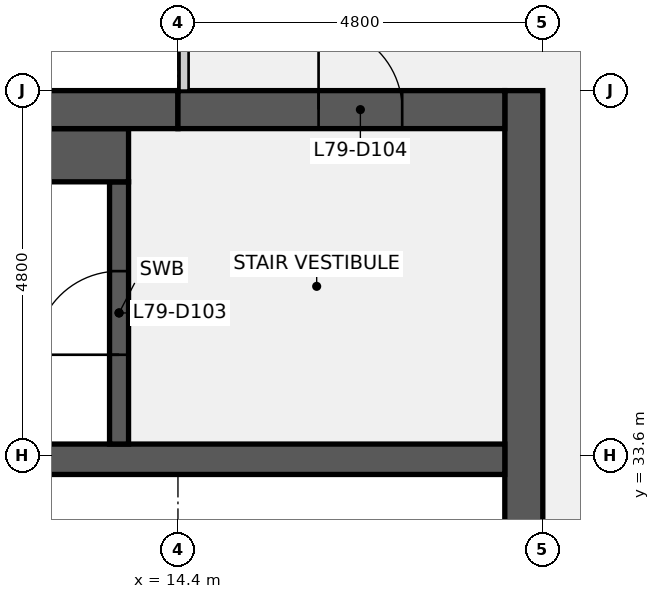
"""IFC4 building model, lengths in metres.
Left out: names, types, materials, properties, quantities, classifications, styles, units other than length and angle.
Written with IfcOpenShell. Run it as: python <this file> out.ifc"""

import sys

from ifc_helpers import new_model, si_unit, direction, frame, frame_2d, origin, place, context, subcontext, project, spatial, rectangle, extrude, element, fill, save


model = new_model("IFC4")
c1 = context("Model", 3, precision=1e-05, world=origin(), true_north=direction((0.0, 1.0)))
c2 = subcontext(c1, "Body", "Model", "MODEL_VIEW")
j1 = project(units=[si_unit("LENGTHUNIT", "METRE"), si_unit("PLANEANGLEUNIT", "RADIAN")], contexts=[c1])
p1 = place(None, origin())
s1 = spatial("IfcSite", under=j1, at=p1, CompositionType="ELEMENT")
p2 = place(p1, origin())
s2 = spatial("IfcBuilding", under=s1, at=p2, CompositionType="ELEMENT")
p3 = place(p2, frame((0.0, 0.0, 354.3)))
s3 = spatial("IfcBuildingStorey", under=s2, at=p3, CompositionType="ELEMENT", Elevation=354.3)
p4 = place(p3, frame((18.95, 38.4, 0.0), z_axis=(0.0, 0.0, 1.0), x_axis=(0.0, -1.0, 0.0)))
e1 = element("IfcWall", 1, at=p4, inside=s3, PredefinedType="SHEAR", context=c2, shape_type="SweptSolid", body=[
    extrude(rectangle(XDim=28.8, YDim=0.5, at=frame_2d((14.4, 0.0))), origin(), (0.0, 0.0, 1.0), 3.75),
])
p5 = place(p4, frame((18.3, 0.0, 0.0)))
e2 = element("IfcOpeningElement", 2, at=p5, cuts=e1, PredefinedType="OPENING", context=c2, shape_type="SweptSolid", body=[
    extrude(rectangle(XDim=1.8, YDim=2.1, at=frame_2d((0.9, 1.05))), frame((0.0, 0.26, 0.0), z_axis=(0.0, -1.0, 0.0), x_axis=(1.0, 0.0, 0.0)), (0.0, 0.0, 1.0), 0.52),
])
p6 = place(p4, frame((8.7, 0.0, 0.0)))
e3 = element("IfcOpeningElement", 3, at=p6, cuts=e1, PredefinedType="OPENING", context=c2, shape_type="SweptSolid", body=[
    extrude(rectangle(XDim=1.8, YDim=2.1, at=frame_2d((0.9, 1.05))), frame((0.0, 0.26, 0.0), z_axis=(0.0, -1.0, 0.0), x_axis=(1.0, 0.0, 0.0)), (0.0, 0.0, 1.0), 0.52),
])
p7 = place(p3, frame((0.5, 33.55, 0.0), z_axis=(0.0, 0.0, 1.0), x_axis=(1.0, 0.0, 0.0)))
e4 = element("IfcWall", 4, at=p7, inside=s3, PredefinedType="SHEAR", context=c2, shape_type="SweptSolid", body=[
    extrude(rectangle(XDim=18.2, YDim=0.4, at=frame_2d((9.1, 0.0))), origin(), (0.0, 0.0, 1.0), 3.75),
])
p8 = place(p3, frame((13.625, 33.75, 0.0), z_axis=(0.0, 0.0, 1.0), x_axis=(0.0, 1.0, 0.0)))
e5 = element("IfcWall", 5, at=p8, inside=s3, PredefinedType="SHEAR", context=c2, shape_type="SweptSolid", body=[
    extrude(rectangle(XDim=3.45, YDim=0.25, at=frame_2d((1.725, 0.0))), origin(), (0.0, 0.0, 1.0), 3.75),
])
p9 = place(p8, frame((1.175, 0.0, 0.0)))
e6 = element("IfcOpeningElement", 6, at=p9, cuts=e5, PredefinedType="OPENING", context=c2, shape_type="SweptSolid", body=[
    extrude(rectangle(XDim=1.1, YDim=2.1, at=frame_2d((0.55, 1.05))), frame((0.0, 0.135, 0.0), z_axis=(0.0, -1.0, 0.0), x_axis=(1.0, 0.0, 0.0)), (0.0, 0.0, 1.0), 0.27),
])
p10 = place(p3, frame((6.25, 37.55, 0.0), z_axis=(0.0, 0.0, 1.0), x_axis=(1.0, 0.0, 0.0)))
e7 = element("IfcWall", 7, at=p10, inside=s3, PredefinedType="SHEAR", context=c2, shape_type="SweptSolid", body=[
    extrude(rectangle(XDim=7.5, YDim=0.7, at=frame_2d((3.75, 0.0))), origin(), (0.0, 0.0, 1.0), 3.75),
])
p11 = place(p3, frame((0.5, 38.15, 0.0), z_axis=(0.0, 0.0, 1.0), x_axis=(1.0, 0.0, 0.0)))
e8 = element("IfcWall", 8, at=p11, inside=s3, PredefinedType="SHEAR", context=c2, shape_type="SweptSolid", body=[
    extrude(rectangle(XDim=13.9, YDim=0.5, at=frame_2d((6.95, 0.0))), origin(), (0.0, 0.0, 1.0), 3.75),
])
p12 = place(p3, frame((14.4, 38.15, 0.0), z_axis=(0.0, 0.0, 1.0), x_axis=(1.0, 0.0, 0.0)))
e9 = element("IfcWall", 9, at=p12, inside=s3, PredefinedType="SHEAR", context=c2, shape_type="SweptSolid", body=[
    extrude(rectangle(XDim=4.3, YDim=0.5, at=frame_2d((2.15, 0.0))), origin(), (0.0, 0.0, 1.0), 3.75),
])
p13 = place(p12, frame((1.85, 0.0, 0.0)))
e10 = element("IfcOpeningElement", 10, at=p13, cuts=e9, PredefinedType="OPENING", context=c2, shape_type="SweptSolid", body=[
    extrude(rectangle(XDim=1.1, YDim=2.1, at=frame_2d((0.55, 1.05))), frame((0.0, 0.26, 0.0), z_axis=(0.0, -1.0, 0.0), x_axis=(1.0, 0.0, 0.0)), (0.0, 0.0, 1.0), 0.52),
])
p14 = place(p9, origin())
e11 = element("IfcDoor", 11, at=p14, inside=s3, OperationType="SINGLE_SWING_LEFT", PredefinedType="DOOR", context=c2, shape_type="SweptSolid", body=[
    extrude(rectangle(XDim=1.1, YDim=2.1, at=frame_2d((0.55, 1.05))), frame((0.0, 0.025, 0.0), z_axis=(0.0, -1.0, 0.0), x_axis=(1.0, 0.0, 0.0)), (0.0, 0.0, 1.0), 0.05),
])
fill(e6, e11)
p15 = place(p13, origin())
e12 = element("IfcDoor", 12, at=p15, inside=s3, OperationType="SINGLE_SWING_LEFT", PredefinedType="DOOR", context=c2, shape_type="SweptSolid", body=[
    extrude(rectangle(XDim=1.1, YDim=2.1, at=frame_2d((0.55, 1.05))), frame((0.0, 0.025, 0.0), z_axis=(0.0, -1.0, 0.0), x_axis=(1.0, 0.0, 0.0)), (0.0, 0.0, 1.0), 0.05),
])
fill(e10, e12)
save(model, sys.argv[1])
